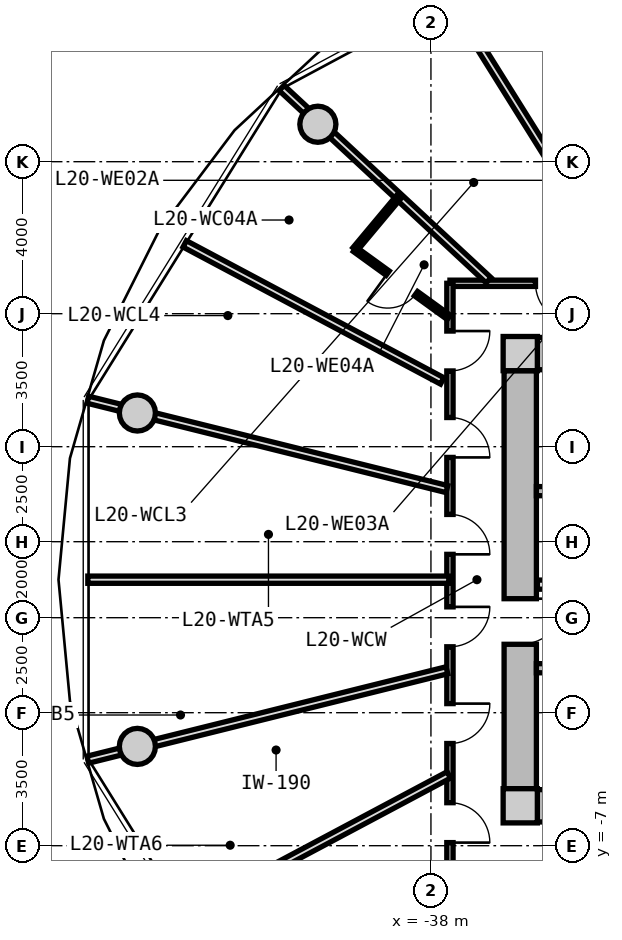
"""IFC4 building model, lengths in metres.
Left out: names, types, materials, properties, quantities, classifications, styles, units other than length and angle.
Written with IfcOpenShell. Run it as: python <this file> out.ifc"""

import sys

from ifc_helpers import new_model, si_unit, direction, frame, frame_2d, origin, origin_2d, place, context, subcontext, project, spatial, rectangle, circle, extrude, source, transform, mapped, element, fill, save


model = new_model("IFC4")
c1 = context("Model", 3, precision=1e-05, world=origin(), true_north=direction((0.0, 1.0)))
c2 = subcontext(c1, "Body", "Model", "MODEL_VIEW")
j1 = project(units=[si_unit("LENGTHUNIT", "METRE"), si_unit("PLANEANGLEUNIT", "RADIAN")], contexts=[c1])
p1 = place(None, origin())
s1 = spatial("IfcSite", under=j1, at=p1, CompositionType="ELEMENT")
p2 = place(p1, origin())
s2 = spatial("IfcBuilding", under=s1, at=p2, CompositionType="ELEMENT")
p3 = place(p2, frame((0.0, 0.0, 67.35)))
s3 = spatial("IfcBuildingStorey", under=s2, at=p3, CompositionType="ELEMENT", Elevation=67.35)
m1 = source(origin(), c2, "Body", "SweptSolid", [
    extrude(rectangle(XDim=0.9, YDim=0.9, at=origin_2d()), origin(), (0.0, 0.0, 1.0), 3.05),
])
for number, where, z_axis, x_axis in (
    (1, (-35.65, -5.95, 0.0), (0.0, 0.0, 1.0), (1.0, 0.0, 0.0)),
    (2, (-35.65, 5.95, 0.0), (0.0, 0.0, 1.0), (1.0, 0.0, 0.0)),
):
    element("IfcColumn", number, at=place(p3, frame(where, z_axis=z_axis, x_axis=x_axis)), inside=s3, PredefinedType="COLUMN", context=c2, shape_type="MappedRepresentation", body=[
        mapped(m1, transform((0.0, 0.0, 0.0), x_axis=(1.0, 0.0, 0.0), y_axis=(0.0, 1.0, 0.0), z_axis=(0.0, 0.0, 1.0), scale=1.0)),
    ])
m2 = source(origin(), c2, "Body", "SweptSolid", [
    extrude(rectangle(XDim=14.4, YDim=0.85, at=frame_2d((7.2, 0.0))), origin(), (0.0, 0.0, 1.0), 2.79),
])
for number, where, z_axis, x_axis in (
    (3, (-35.2, 5.95, 0.0), (0.0, 0.0, 1.0), (1.0, 0.0, 0.0)),
    (4, (-20.8, -5.95, 0.0), (0.0, 0.0, 1.0), (-1.0, 0.0, 0.0)),
):
    element("IfcWall", number, at=place(p3, frame(where, z_axis=z_axis, x_axis=x_axis)), inside=s3, PredefinedType="SHEAR", context=c2, shape_type="MappedRepresentation", body=[
        mapped(m2, transform((0.0, 0.0, 0.0), x_axis=(1.0, 0.0, 0.0), y_axis=(0.0, 1.0, 0.0), z_axis=(0.0, 0.0, 1.0), scale=1.0)),
    ])
m3 = source(origin(), c2, "Body", "SweptSolid", [
    extrude(rectangle(XDim=11.0, YDim=0.85, at=frame_2d((5.5, 0.0))), origin(), (0.0, 0.0, 1.0), 2.79),
])
p4 = place(p3, frame((-35.65, -5.5, 0.0), z_axis=(0.0, 0.0, 1.0), x_axis=(0.0, 1.0, 0.0)))
e5 = element("IfcWall", 5, at=p4, inside=s3, PredefinedType="SHEAR", context=c2, shape_type="MappedRepresentation", body=[
    mapped(m3, transform((0.0, 0.0, 0.0), x_axis=(1.0, 0.0, 0.0), y_axis=(0.0, 1.0, 0.0), z_axis=(0.0, 0.0, 1.0), scale=1.0)),
])
p5 = place(p4, frame((3.8, 0.0, 0.0)))
e6 = element("IfcOpeningElement", 6, at=p5, cuts=e5, PredefinedType="OPENING", context=c2, shape_type="SweptSolid", body=[
    extrude(rectangle(XDim=1.2, YDim=2.15, at=frame_2d((0.6, 1.075))), frame((0.0, 0.435, 0.0), z_axis=(0.0, -1.0, 0.0), x_axis=(1.0, 0.0, 0.0)), (0.0, 0.0, 1.0), 0.87),
])
m4 = source(origin(), c2, "Body", "SweptSolid", [
    extrude(circle(Radius=0.475, at=origin_2d()), origin(), (0.0, 0.0, 1.0), 3.05),
])
for number, where, z_axis, x_axis in (
    (7, (-40.975, 11.985, 0.0), (0.0, 0.0, 1.0), (1.0, 0.0, 0.0)),
    (8, (-45.725, 4.387, 0.0), (0.0, 0.0, 1.0), (1.0, 0.0, 0.0)),
    (9, (-45.725, -4.387, 0.0), (0.0, 0.0, 1.0), (1.0, 0.0, 0.0)),
):
    element("IfcColumn", number, at=place(p3, frame(where, z_axis=z_axis, x_axis=x_axis)), inside=s3, PredefinedType="COLUMN", context=c2, shape_type="MappedRepresentation", body=[
        mapped(m4, transform((0.0, 0.0, 0.0), x_axis=(1.0, 0.0, 0.0), y_axis=(0.0, 1.0, 0.0), z_axis=(0.0, 0.0, 1.0), scale=1.0)),
    ])
m5 = source(origin(), c2, "Body", "SweptSolid", [
    extrude(rectangle(XDim=7.765, YDim=0.24, at=frame_2d((3.883, 0.0))), origin(), (0.0, 0.0, 1.0), 2.79),
])
p6 = place(p3, frame((-35.225, 2.33, 0.0), z_axis=(0.0, 0.0, 1.0), x_axis=(1.0, 0.0, 0.0)))
e10 = element("IfcWall", 10, at=p6, inside=s3, PredefinedType="PARTITIONING", context=c2, shape_type="MappedRepresentation", body=[
    mapped(m5, transform((0.0, 0.0, 0.0), x_axis=(1.0, 0.0, 0.0), y_axis=(0.0, 1.0, 0.0), z_axis=(0.0, 0.0, 1.0), scale=1.0)),
])
p7 = place(p3, frame((-35.225, -2.33, 0.0), z_axis=(0.0, 0.0, 1.0), x_axis=(1.0, 0.0, 0.0)))
e11 = element("IfcWall", 11, at=p7, inside=s3, PredefinedType="PARTITIONING", context=c2, shape_type="MappedRepresentation", body=[
    mapped(m5, transform((0.0, 0.0, 0.0), x_axis=(1.0, 0.0, 0.0), y_axis=(0.0, 1.0, 0.0), z_axis=(0.0, 0.0, 1.0), scale=1.0)),
])
p8 = place(p7, frame((0.885, 0.0, 0.0)))
e12 = element("IfcOpeningElement", 12, at=p8, cuts=e11, PredefinedType="OPENING", context=c2, shape_type="SweptSolid", body=[
    extrude(rectangle(XDim=1.1, YDim=2.15, at=frame_2d((0.55, 1.075))), frame((0.0, 0.13, 0.0), z_axis=(0.0, -1.0, 0.0), x_axis=(1.0, 0.0, 0.0)), (0.0, 0.0, 1.0), 0.26),
])
m6 = source(origin(), c2, "Body", "SweptSolid", [
    extrude(rectangle(XDim=7.62, YDim=0.24, at=frame_2d((3.81, 0.0))), origin(), (0.0, 0.0, 1.0), 2.775),
])
p9 = place(p3, frame((-35.2, -0.13, 0.0), z_axis=(0.0, 0.0, 1.0), x_axis=(1.0, 0.0, 0.0)))
e13 = element("IfcWall", 13, at=p9, inside=s3, PredefinedType="PARTITIONING", context=c2, shape_type="MappedRepresentation", body=[
    mapped(m6, transform((0.0, 0.0, 0.0), x_axis=(1.0, 0.0, 0.0), y_axis=(0.0, 1.0, 0.0), z_axis=(0.0, 0.0, 1.0), scale=1.0)),
])
p10 = place(p9, frame((6.22, 0.0, 0.0)))
e14 = element("IfcOpeningElement", 14, at=p10, cuts=e13, PredefinedType="OPENING", context=c2, shape_type="SweptSolid", body=[
    extrude(rectangle(XDim=1.0, YDim=2.1, at=frame_2d((0.5, 1.05))), frame((0.0, 0.13, 0.0), z_axis=(0.0, -1.0, 0.0), x_axis=(1.0, 0.0, 0.0)), (0.0, 0.0, 1.0), 0.26),
])
p11 = place(p9, frame((0.85, 0.0, 0.0)))
e15 = element("IfcOpeningElement", 15, at=p11, cuts=e13, PredefinedType="OPENING", context=c2, shape_type="SweptSolid", body=[
    extrude(rectangle(XDim=1.1, YDim=2.2, at=frame_2d((0.55, 1.1))), frame((0.0, 0.13, 0.0), z_axis=(0.0, -1.0, 0.0), x_axis=(1.0, 0.0, 0.0)), (0.0, 0.0, 1.0), 0.26),
])
p12 = place(p9, frame((3.85, 0.0, 0.0)))
e16 = element("IfcOpeningElement", 16, at=p12, cuts=e13, PredefinedType="OPENING", context=c2, shape_type="SweptSolid", body=[
    extrude(rectangle(XDim=1.1, YDim=2.2, at=frame_2d((0.55, 1.1))), frame((0.0, 0.13, 0.0), z_axis=(0.0, -1.0, 0.0), x_axis=(1.0, 0.0, 0.0)), (0.0, 0.0, 1.0), 0.26),
])
m7 = source(origin(), c2, "Body", "SweptSolid", [
    extrude(rectangle(XDim=19.0, YDim=0.165, at=frame_2d((9.5, 0.0))), origin(), (0.0, 0.0, 1.0), 2.775),
])
p13 = place(p3, frame((-37.5, 7.8, 0.0), z_axis=(0.0, 0.0, 1.0), x_axis=(1.0, 0.0, 0.0)))
e17 = element("IfcWall", 17, at=p13, inside=s3, PredefinedType="PARTITIONING", context=c2, shape_type="MappedRepresentation", body=[
    mapped(m7, transform((0.0, 0.0, 0.0), x_axis=(1.0, 0.0, 0.0), y_axis=(0.0, 1.0, 0.0), z_axis=(0.0, 0.0, 1.0), scale=1.0)),
])
p14 = place(p13, frame((14.653, 0.0, 0.0)))
e18 = element("IfcOpeningElement", 18, at=p14, cuts=e17, PredefinedType="OPENING", context=c2, shape_type="SweptSolid", body=[
    extrude(rectangle(XDim=1.05, YDim=2.15, at=frame_2d((0.525, 1.075))), frame((0.0, 0.093, 0.0), z_axis=(0.0, -1.0, 0.0), x_axis=(1.0, 0.0, 0.0)), (0.0, 0.0, 1.0), 0.185),
])
p15 = place(p13, frame((12.5, 0.0, 0.0)))
e19 = element("IfcOpeningElement", 19, at=p15, cuts=e17, PredefinedType="OPENING", context=c2, shape_type="SweptSolid", body=[
    extrude(rectangle(XDim=1.05, YDim=2.15, at=frame_2d((0.525, 1.075))), frame((0.0, 0.093, 0.0), z_axis=(0.0, -1.0, 0.0), x_axis=(1.0, 0.0, 0.0)), (0.0, 0.0, 1.0), 0.185),
])
p16 = place(p13, frame((9.352, 0.0, 0.0)))
e20 = element("IfcOpeningElement", 20, at=p16, cuts=e17, PredefinedType="OPENING", context=c2, shape_type="SweptSolid", body=[
    extrude(rectangle(XDim=1.05, YDim=2.15, at=frame_2d((0.525, 1.075))), frame((0.0, 0.093, 0.0), z_axis=(0.0, -1.0, 0.0), x_axis=(1.0, 0.0, 0.0)), (0.0, 0.0, 1.0), 0.185),
])
p17 = place(p13, frame((7.806, 0.0, 0.0)))
e21 = element("IfcOpeningElement", 21, at=p17, cuts=e17, PredefinedType="OPENING", context=c2, shape_type="SweptSolid", body=[
    extrude(rectangle(XDim=1.05, YDim=2.15, at=frame_2d((0.525, 1.075))), frame((0.0, 0.093, 0.0), z_axis=(0.0, -1.0, 0.0), x_axis=(1.0, 0.0, 0.0)), (0.0, 0.0, 1.0), 0.185),
])
p18 = place(p13, frame((4.773, 0.0, 0.0)))
e22 = element("IfcOpeningElement", 22, at=p18, cuts=e17, PredefinedType="OPENING", context=c2, shape_type="SweptSolid", body=[
    extrude(rectangle(XDim=1.05, YDim=2.15, at=frame_2d((0.525, 1.075))), frame((0.0, 0.093, 0.0), z_axis=(0.0, -1.0, 0.0), x_axis=(1.0, 0.0, 0.0)), (0.0, 0.0, 1.0), 0.185),
])
p19 = place(p13, frame((2.251, 0.0, 0.0)))
e23 = element("IfcOpeningElement", 23, at=p19, cuts=e17, PredefinedType="OPENING", context=c2, shape_type="SweptSolid", body=[
    extrude(rectangle(XDim=1.05, YDim=2.15, at=frame_2d((0.525, 1.075))), frame((0.0, 0.093, 0.0), z_axis=(0.0, -1.0, 0.0), x_axis=(1.0, 0.0, 0.0)), (0.0, 0.0, 1.0), 0.185),
])
m8 = source(origin(), c2, "Body", "SweptSolid", [
    extrude(rectangle(XDim=15.6, YDim=0.165, at=frame_2d((7.8, 0.0))), origin(), (0.0, 0.0, 1.0), 2.775),
])
p20 = place(p3, frame((-37.5, -7.8, 0.0), z_axis=(0.0, 0.0, 1.0), x_axis=(0.0, 1.0, 0.0)))
e24 = element("IfcWall", 24, at=p20, inside=s3, PredefinedType="PARTITIONING", context=c2, shape_type="MappedRepresentation", body=[
    mapped(m8, transform((0.0, 0.0, 0.0), x_axis=(1.0, 0.0, 0.0), y_axis=(0.0, 1.0, 0.0), z_axis=(0.0, 0.0, 1.0), scale=1.0)),
])
p21 = place(p20, frame((3.489, 0.0, 0.0)))
e25 = element("IfcOpeningElement", 25, at=p21, cuts=e24, PredefinedType="OPENING", context=c2, shape_type="SweptSolid", body=[
    extrude(rectangle(XDim=1.05, YDim=2.15, at=frame_2d((0.525, 1.075))), frame((0.0, 0.093, 0.0), z_axis=(0.0, -1.0, 0.0), x_axis=(1.0, 0.0, 0.0)), (0.0, 0.0, 1.0), 0.185),
])
p22 = place(p20, frame((0.882, 0.0, 0.0)))
e26 = element("IfcOpeningElement", 26, at=p22, cuts=e24, PredefinedType="OPENING", context=c2, shape_type="SweptSolid", body=[
    extrude(rectangle(XDim=1.05, YDim=2.15, at=frame_2d((0.525, 1.075))), frame((0.0, 0.093, 0.0), z_axis=(0.0, -1.0, 0.0), x_axis=(1.0, 0.0, 0.0)), (0.0, 0.0, 1.0), 0.185),
])
p23 = place(p20, frame((13.293, 0.0, 0.0)))
e27 = element("IfcOpeningElement", 27, at=p23, cuts=e24, PredefinedType="OPENING", context=c2, shape_type="SweptSolid", body=[
    extrude(rectangle(XDim=1.05, YDim=2.15, at=frame_2d((0.525, 1.075))), frame((0.0, 0.093, 0.0), z_axis=(0.0, -1.0, 0.0), x_axis=(1.0, 0.0, 0.0)), (0.0, 0.0, 1.0), 0.185),
])
p24 = place(p20, frame((11.018, 0.0, 0.0)))
e28 = element("IfcOpeningElement", 28, at=p24, cuts=e24, PredefinedType="OPENING", context=c2, shape_type="SweptSolid", body=[
    extrude(rectangle(XDim=1.05, YDim=2.15, at=frame_2d((0.525, 1.075))), frame((0.0, 0.093, 0.0), z_axis=(0.0, -1.0, 0.0), x_axis=(1.0, 0.0, 0.0)), (0.0, 0.0, 1.0), 0.185),
])
p25 = place(p20, frame((8.467, 0.0, 0.0)))
e29 = element("IfcOpeningElement", 29, at=p25, cuts=e24, PredefinedType="OPENING", context=c2, shape_type="SweptSolid", body=[
    extrude(rectangle(XDim=1.05, YDim=2.15, at=frame_2d((0.525, 1.075))), frame((0.0, 0.093, 0.0), z_axis=(0.0, -1.0, 0.0), x_axis=(1.0, 0.0, 0.0)), (0.0, 0.0, 1.0), 0.185),
])
p26 = place(p20, frame((6.035, 0.0, 0.0)))
e30 = element("IfcOpeningElement", 30, at=p26, cuts=e24, PredefinedType="OPENING", context=c2, shape_type="SweptSolid", body=[
    extrude(rectangle(XDim=1.05, YDim=2.15, at=frame_2d((0.525, 1.075))), frame((0.0, 0.093, 0.0), z_axis=(0.0, -1.0, 0.0), x_axis=(1.0, 0.0, 0.0)), (0.0, 0.0, 1.0), 0.185),
])
m9 = source(origin(), c2, "Body", "SweptSolid", [
    extrude(rectangle(XDim=9.737, YDim=0.19, at=frame_2d((4.869, 0.0))), origin(), (0.0, 0.0, 1.0), 2.225),
])
p27 = place(p3, frame((-37.58, -2.385, 0.0), z_axis=(0.0, 0.0, 1.0), x_axis=(-0.970392716238, -0.241532557375, 0.0)))
e31 = element("IfcWall", 31, at=p27, inside=s3, PredefinedType="PARTITIONING", context=c2, shape_type="MappedRepresentation", body=[
    mapped(m9, transform((0.0, 0.0, 0.0), x_axis=(1.0, 0.0, 0.0), y_axis=(0.0, 1.0, 0.0), z_axis=(0.0, 0.0, 1.0), scale=1.0)),
])
m10 = source(origin(), c2, "Body", "SweptSolid", [
    extrude(rectangle(XDim=7.873, YDim=0.19, at=frame_2d((3.937, 0.0))), origin(), (0.0, 0.0, 1.0), 2.775),
])
p28 = place(p3, frame((-37.53, -5.138, 0.0), z_axis=(0.0, 0.0, 1.0), x_axis=(-0.882666052726, -0.470000680175, 0.0)))
e32 = element("IfcWall", 32, at=p28, inside=s3, PredefinedType="PARTITIONING", context=c2, shape_type="MappedRepresentation", body=[
    mapped(m10, transform((0.0, 0.0, 0.0), x_axis=(1.0, 0.0, 0.0), y_axis=(0.0, 1.0, 0.0), z_axis=(0.0, 0.0, 1.0), scale=1.0)),
])
m11 = source(origin(), c2, "Body", "SweptSolid", [
    extrude(rectangle(XDim=7.435, YDim=0.19, at=frame_2d((3.717, 0.0))), origin(), (0.0, 0.0, 1.0), 2.225),
])
p29 = place(p3, frame((-36.483, 7.88, 0.0), z_axis=(0.0, 0.0, 1.0), x_axis=(-0.732651956848, 0.680603489652, 0.0)))
e33 = element("IfcWall", 33, at=p29, inside=s3, PredefinedType="PARTITIONING", context=c2, shape_type="MappedRepresentation", body=[
    mapped(m11, transform((0.0, 0.0, 0.0), x_axis=(1.0, 0.0, 0.0), y_axis=(0.0, 1.0, 0.0), z_axis=(0.0, 0.0, 1.0), scale=1.0)),
])
m12 = source(origin(), c2, "Body", "SweptSolid", [
    extrude(rectangle(XDim=8.598, YDim=0.19, at=frame_2d((4.299, 0.0))), origin(), (0.0, 0.0, 1.0), 2.775),
])
p30 = place(p3, frame((-32.957, 8.017, 0.0), z_axis=(0.0, 0.0, 1.0), x_axis=(-0.530039776395, 0.847972779893, 0.0)))
e34 = element("IfcWall", 34, at=p30, inside=s3, PredefinedType="PARTITIONING", context=c2, shape_type="MappedRepresentation", body=[
    mapped(m12, transform((0.0, 0.0, 0.0), x_axis=(1.0, 0.0, 0.0), y_axis=(0.0, 1.0, 0.0), z_axis=(0.0, 0.0, 1.0), scale=1.0)),
])
p31 = place(p3, frame((-37.58, 2.385, 0.0), z_axis=(0.0, 0.0, 1.0), x_axis=(-0.970392716238, 0.241532557375, 0.0)))
e35 = element("IfcWall", 35, at=p31, inside=s3, PredefinedType="PARTITIONING", context=c2, shape_type="MappedRepresentation", body=[
    mapped(m9, transform((0.0, 0.0, 0.0), x_axis=(1.0, 0.0, 0.0), y_axis=(0.0, 1.0, 0.0), z_axis=(0.0, 0.0, 1.0), scale=1.0)),
])
m13 = source(origin(), c2, "Body", "SweptSolid", [
    extrude(rectangle(XDim=7.677, YDim=0.19, at=frame_2d((3.838, 0.0))), origin(), (0.0, 0.0, 1.0), 2.775),
])
p32 = place(p3, frame((-37.703, 5.231, 0.0), z_axis=(0.0, 0.0, 1.0), x_axis=(-0.882725057546, 0.469889851753, 0.0)))
e36 = element("IfcWall", 36, at=p32, inside=s3, PredefinedType="PARTITIONING", context=c2, shape_type="MappedRepresentation", body=[
    mapped(m13, transform((0.0, 0.0, 0.0), x_axis=(1.0, 0.0, 0.0), y_axis=(0.0, 1.0, 0.0), z_axis=(0.0, 0.0, 1.0), scale=1.0)),
])
m14 = source(origin(), c2, "Body", "SweptSolid", [
    extrude(rectangle(XDim=3.051, YDim=0.14, at=frame_2d((1.525, 0.0))), origin(), (0.0, 0.0, 1.0), 2.775),
])
p33 = place(p3, frame((-37.53, 6.903, 0.0), z_axis=(0.0, 0.0, 1.0), x_axis=(-0.809849031404, 0.586638343729, 0.0)))
e37 = element("IfcWall", 37, at=p33, inside=s3, PredefinedType="PARTITIONING", context=c2, shape_type="MappedRepresentation", body=[
    mapped(m14, transform((0.0, 0.0, 0.0), x_axis=(1.0, 0.0, 0.0), y_axis=(0.0, 1.0, 0.0), z_axis=(0.0, 0.0, 1.0), scale=1.0)),
])
p34 = place(p33, frame((1.065, 0.0, 0.0)))
e38 = element("IfcOpeningElement", 38, at=p34, cuts=e37, PredefinedType="OPENING", context=c2, shape_type="SweptSolid", body=[
    extrude(rectangle(XDim=0.92, YDim=2.1, at=frame_2d((0.46, 1.05))), frame((0.0, 0.08, 0.0), z_axis=(0.0, -1.0, 0.0), x_axis=(1.0, 0.0, 0.0)), (0.0, 0.0, 1.0), 0.16),
])
m15 = source(origin(), c2, "Body", "SweptSolid", [
    extrude(rectangle(XDim=1.84, YDim=0.14, at=frame_2d((0.92, 0.0))), origin(), (0.0, 0.0, 1.0), 2.415),
])
p35 = place(p3, frame((-40.0, 8.692, 0.0), z_axis=(0.0, 0.0, 1.0), x_axis=(0.641410397049, 0.767197955262, 0.0)))
e39 = element("IfcWall", 39, at=p35, inside=s3, PredefinedType="PARTITIONING", context=c2, shape_type="MappedRepresentation", body=[
    mapped(m15, transform((0.0, 0.0, 0.0), x_axis=(1.0, 0.0, 0.0), y_axis=(0.0, 1.0, 0.0), z_axis=(0.0, 0.0, 1.0), scale=1.0)),
])
m16 = source(origin(), c2, "Body", "SweptSolid", [
    extrude(rectangle(XDim=9.499, YDim=0.19, at=frame_2d((4.75, 0.0))), origin(), (0.0, 0.0, 1.0), 2.775),
])
p36 = place(p3, frame((-37.53, 0.0, 0.0), z_axis=(0.0, 0.0, 1.0), x_axis=(-1.0, 0.0, 0.0)))
e40 = element("IfcWall", 40, at=p36, inside=s3, PredefinedType="PARTITIONING", context=c2, shape_type="MappedRepresentation", body=[
    mapped(m16, transform((0.0, 0.0, 0.0), x_axis=(1.0, 0.0, 0.0), y_axis=(0.0, 1.0, 0.0), z_axis=(0.0, 0.0, 1.0), scale=1.0)),
])
m17 = source(origin(), c2, "Body", "SweptSolid", [
    extrude(rectangle(XDim=1.2, YDim=2.15, at=frame_2d((0.6, 1.075))), frame((0.0, 0.025, 0.0), z_axis=(0.0, -1.0, 0.0), x_axis=(1.0, 0.0, 0.0)), (0.0, 0.0, 1.0), 0.05),
])
p37 = place(p5, frame((1.2, 0.0, 0.0), z_axis=(0.0, 0.0, 1.0), x_axis=(-1.0, 0.0, 0.0)))
e41 = element("IfcDoor", 41, at=p37, inside=s3, OperationType="SINGLE_SWING_LEFT", PredefinedType="DOOR", context=c2, shape_type="MappedRepresentation", body=[
    mapped(m17, transform((0.0, 0.0, 0.0), x_axis=(1.0, 0.0, 0.0), y_axis=(0.0, 1.0, 0.0), z_axis=(0.0, 0.0, 1.0), scale=1.0)),
])
fill(e6, e41)
m18 = source(origin(), c2, "Body", "SweptSolid", [
    extrude(rectangle(XDim=1.05, YDim=2.15, at=frame_2d((0.525, 1.075))), frame((0.0, 0.025, 0.0), z_axis=(0.0, -1.0, 0.0), x_axis=(1.0, 0.0, 0.0)), (0.0, 0.0, 1.0), 0.05),
])
p38 = place(p21, frame((1.05, 0.0, 0.0), z_axis=(0.0, 0.0, 1.0), x_axis=(-1.0, 0.0, 0.0)))
e42 = element("IfcDoor", 42, at=p38, inside=s3, OperationType="SINGLE_SWING_LEFT", PredefinedType="DOOR", context=c2, shape_type="MappedRepresentation", body=[
    mapped(m18, transform((0.0, 0.0, 0.0), x_axis=(1.0, 0.0, 0.0), y_axis=(0.0, 1.0, 0.0), z_axis=(0.0, 0.0, 1.0), scale=1.0)),
])
fill(e25, e42)
p39 = place(p22, frame((1.05, 0.0, 0.0), z_axis=(0.0, 0.0, 1.0), x_axis=(-1.0, 0.0, 0.0)))
e43 = element("IfcDoor", 43, at=p39, inside=s3, OperationType="SINGLE_SWING_RIGHT", PredefinedType="DOOR", context=c2, shape_type="MappedRepresentation", body=[
    mapped(m18, transform((0.0, 0.0, 0.0), x_axis=(1.0, 0.0, 0.0), y_axis=(0.0, 1.0, 0.0), z_axis=(0.0, 0.0, 1.0), scale=1.0)),
])
fill(e26, e43)
p40 = place(p19, frame((1.05, 0.0, 0.0), z_axis=(0.0, 0.0, 1.0), x_axis=(-1.0, 0.0, 0.0)))
e44 = element("IfcDoor", 44, at=p40, inside=s3, OperationType="SINGLE_SWING_LEFT", PredefinedType="DOOR", context=c2, shape_type="MappedRepresentation", body=[
    mapped(m18, transform((0.0, 0.0, 0.0), x_axis=(1.0, 0.0, 0.0), y_axis=(0.0, 1.0, 0.0), z_axis=(0.0, 0.0, 1.0), scale=1.0)),
])
fill(e23, e44)
p41 = place(p23, frame((1.05, 0.0, 0.0), z_axis=(0.0, 0.0, 1.0), x_axis=(-1.0, 0.0, 0.0)))
e45 = element("IfcDoor", 45, at=p41, inside=s3, OperationType="SINGLE_SWING_LEFT", PredefinedType="DOOR", context=c2, shape_type="MappedRepresentation", body=[
    mapped(m18, transform((0.0, 0.0, 0.0), x_axis=(1.0, 0.0, 0.0), y_axis=(0.0, 1.0, 0.0), z_axis=(0.0, 0.0, 1.0), scale=1.0)),
])
fill(e27, e45)
m19 = source(origin(), c2, "Body", "SweptSolid", [
    extrude(rectangle(XDim=0.92, YDim=2.1, at=frame_2d((0.46, 1.05))), frame((0.0, 0.025, 0.0), z_axis=(0.0, -1.0, 0.0), x_axis=(1.0, 0.0, 0.0)), (0.0, 0.0, 1.0), 0.05),
])
p42 = place(p34, origin())
e46 = element("IfcDoor", 46, at=p42, inside=s3, OperationType="SINGLE_SWING_RIGHT", PredefinedType="DOOR", context=c2, shape_type="MappedRepresentation", body=[
    mapped(m19, transform((0.0, 0.0, 0.0), x_axis=(1.0, 0.0, 0.0), y_axis=(0.0, 1.0, 0.0), z_axis=(0.0, 0.0, 1.0), scale=1.0)),
])
fill(e38, e46)
p43 = place(p24, frame((1.05, 0.0, 0.0), z_axis=(0.0, 0.0, 1.0), x_axis=(-1.0, 0.0, 0.0)))
e47 = element("IfcDoor", 47, at=p43, inside=s3, OperationType="SINGLE_SWING_RIGHT", PredefinedType="DOOR", context=c2, shape_type="MappedRepresentation", body=[
    mapped(m18, transform((0.0, 0.0, 0.0), x_axis=(1.0, 0.0, 0.0), y_axis=(0.0, 1.0, 0.0), z_axis=(0.0, 0.0, 1.0), scale=1.0)),
])
fill(e28, e47)
p44 = place(p25, frame((1.05, 0.0, 0.0), z_axis=(0.0, 0.0, 1.0), x_axis=(-1.0, 0.0, 0.0)))
e48 = element("IfcDoor", 48, at=p44, inside=s3, OperationType="SINGLE_SWING_RIGHT", PredefinedType="DOOR", context=c2, shape_type="MappedRepresentation", body=[
    mapped(m18, transform((0.0, 0.0, 0.0), x_axis=(1.0, 0.0, 0.0), y_axis=(0.0, 1.0, 0.0), z_axis=(0.0, 0.0, 1.0), scale=1.0)),
])
fill(e29, e48)
p45 = place(p26, frame((1.05, 0.0, 0.0), z_axis=(0.0, 0.0, 1.0), x_axis=(-1.0, 0.0, 0.0)))
e49 = element("IfcDoor", 49, at=p45, inside=s3, OperationType="SINGLE_SWING_LEFT", PredefinedType="DOOR", context=c2, shape_type="MappedRepresentation", body=[
    mapped(m18, transform((0.0, 0.0, 0.0), x_axis=(1.0, 0.0, 0.0), y_axis=(0.0, 1.0, 0.0), z_axis=(0.0, 0.0, 1.0), scale=1.0)),
])
fill(e30, e49)
save(model, sys.argv[1])
